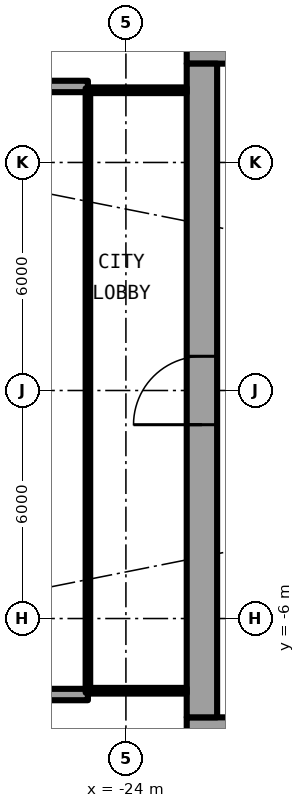
"""IFC4 building model, lengths in metres.
Left out: names, types, materials, properties, quantities, classifications, styles, units other than length and angle.
Written with IfcOpenShell. Run it as: python <this file> out.ifc"""

import sys

from ifc_helpers import new_model, si_unit, direction, frame, frame_2d, origin, place, context, subcontext, project, spatial, rectangle, extrude, element, fill, save


model = new_model("IFC4")
c1 = context("Model", 3, precision=1e-05, world=origin(), true_north=direction((0.0, 1.0)))
c2 = subcontext(c1, "Body", "Model", "MODEL_VIEW")
j1 = project(units=[si_unit("LENGTHUNIT", "METRE"), si_unit("PLANEANGLEUNIT", "RADIAN")], contexts=[c1])
p1 = place(None, origin())
s1 = spatial("IfcSite", under=j1, at=p1, CompositionType="ELEMENT")
p2 = place(p1, origin())
s2 = spatial("IfcBuilding", under=s1, at=p2, CompositionType="ELEMENT")
p3 = place(p2, frame((0.0, 0.0, 31.95)))
s3 = spatial("IfcBuildingStorey", under=s2, at=p3, CompositionType="ELEMENT", Elevation=31.95)
for number, where, z_axis, x_axis in (
    (1, (-25.0, 8.0, 0.0), (0.0, 0.0, 1.0), (-1.0, 0.0, 0.0)),
    (2, (-25.0, -8.0, 0.0), (0.0, 0.0, 1.0), (-1.0, 0.0, 0.0)),
):
    element("IfcWall", number, at=place(p3, frame(where, z_axis=z_axis, x_axis=x_axis)), inside=s3, PredefinedType="SOLIDWALL", context=c2, shape_type="SweptSolid", body=[
        extrude(rectangle(XDim=2.667, YDim=0.3, at=frame_2d((1.333, 0.0))), origin(), (0.0, 0.0, 1.0), 2.7),
    ])
p4 = place(p3, frame((-22.4, -9.0, 0.0), z_axis=(0.0, 0.0, 1.0), x_axis=(1.0, 0.0, 0.0)))
e3 = element("IfcWall", 3, at=p4, inside=s3, PredefinedType="SHEAR", context=c2, shape_type="SweptSolid", body=[
    extrude(rectangle(XDim=14.2, YDim=0.8, at=frame_2d((7.1, 0.0))), origin(), (0.0, 0.0, 1.0), 3.05),
])
p5 = place(p4, frame((1.325, 0.0, 0.0)))
e4 = element("IfcOpeningElement", 4, at=p5, cuts=e3, PredefinedType="OPENING", context=c2, shape_type="SweptSolid", body=[
    extrude(rectangle(XDim=1.2, YDim=2.3, at=frame_2d((0.6, 1.15))), frame((0.0, 0.41, 0.0), z_axis=(0.0, -1.0, 0.0), x_axis=(1.0, 0.0, 0.0)), (0.0, 0.0, 1.0), 0.82),
])
p6 = place(p3, frame((-8.2, 9.0, 0.0), z_axis=(0.0, 0.0, 1.0), x_axis=(-1.0, 0.0, 0.0)))
e5 = element("IfcWall", 5, at=p6, inside=s3, PredefinedType="SHEAR", context=c2, shape_type="SweptSolid", body=[
    extrude(rectangle(XDim=14.2, YDim=0.8, at=frame_2d((7.1, 0.0))), origin(), (0.0, 0.0, 1.0), 3.05),
])
p7 = place(p6, frame((11.675, 0.0, 0.0)))
e6 = element("IfcOpeningElement", 6, at=p7, cuts=e5, PredefinedType="OPENING", context=c2, shape_type="SweptSolid", body=[
    extrude(rectangle(XDim=1.2, YDim=2.3, at=frame_2d((0.6, 1.15))), frame((0.0, 0.41, 0.0), z_axis=(0.0, -1.0, 0.0), x_axis=(1.0, 0.0, 0.0)), (0.0, 0.0, 1.0), 0.82),
])
p8 = place(p3, frame((-22.0, -8.6, 0.0), z_axis=(0.0, 0.0, 1.0), x_axis=(0.0, 1.0, 0.0)))
e7 = element("IfcWall", 7, at=p8, inside=s3, PredefinedType="SHEAR", context=c2, shape_type="SweptSolid", body=[
    extrude(rectangle(XDim=17.2, YDim=0.8, at=frame_2d((8.6, 0.0))), origin(), (0.0, 0.0, 1.0), 3.05),
])
p9 = place(p8, frame((7.7, 0.0, 0.0)))
e8 = element("IfcOpeningElement", 8, at=p9, cuts=e7, PredefinedType="OPENING", context=c2, shape_type="SweptSolid", body=[
    extrude(rectangle(XDim=1.8, YDim=2.3, at=frame_2d((0.9, 1.15))), frame((0.0, 0.41, 0.0), z_axis=(0.0, -1.0, 0.0), x_axis=(1.0, 0.0, 0.0)), (0.0, 0.0, 1.0), 0.82),
])
for number, where, z_axis, x_axis in (
    (9, (-22.4, 7.9, 0.0), (0.0, 0.0, 1.0), (-1.0, 0.0, 0.0)),
    (10, (-22.4, -7.9, 0.0), (0.0, 0.0, 1.0), (-1.0, 0.0, 0.0)),
):
    element("IfcWall", number, at=place(p3, frame(where, z_axis=z_axis, x_axis=x_axis)), inside=s3, PredefinedType="PARTITIONING", context=c2, shape_type="SweptSolid", body=[
        extrude(rectangle(XDim=2.54, YDim=0.15, at=frame_2d((1.27, 0.0))), origin(), (0.0, 0.0, 1.0), 2.7),
    ])
p10 = place(p3, frame((-25.0, 7.95, 0.0), z_axis=(0.0, 0.0, 1.0), x_axis=(0.0, -1.0, 0.0)))
e11 = element("IfcWall", 11, at=p10, inside=s3, PredefinedType="PARTITIONING", context=c2, shape_type="SweptSolid", body=[
    extrude(rectangle(XDim=15.9, YDim=0.12, at=frame_2d((7.95, 0.0))), origin(), (0.0, 0.0, 1.0), 2.7),
])
p11 = place(p10, frame((0.95, 0.0, 0.1)))
e12 = element("IfcOpeningElement", 12, at=p11, cuts=e11, PredefinedType="OPENING", context=c2, shape_type="SweptSolid", body=[
    extrude(rectangle(XDim=14.0, YDim=2.35, at=frame_2d((7.0, 1.175))), frame((0.0, 0.07, 0.0), z_axis=(0.0, -1.0, 0.0), x_axis=(1.0, 0.0, 0.0)), (0.0, 0.0, 1.0), 0.14),
])
p12 = place(p9, origin())
e13 = element("IfcDoor", 13, at=p12, inside=s3, OperationType="SINGLE_SWING_LEFT", PredefinedType="DOOR", context=c2, shape_type="SweptSolid", body=[
    extrude(rectangle(XDim=1.8, YDim=2.3, at=frame_2d((0.9, 1.15))), frame((0.0, 0.025, 0.0), z_axis=(0.0, -1.0, 0.0), x_axis=(1.0, 0.0, 0.0)), (0.0, 0.0, 1.0), 0.05),
])
fill(e8, e13)
p13 = place(p11, origin())
e14 = element("IfcWindow", 14, at=p13, inside=s3, PartitioningType="SINGLE_PANEL", PredefinedType="WINDOW", context=c2, shape_type="SweptSolid", body=[
    extrude(rectangle(XDim=14.0, YDim=2.35, at=frame_2d((7.0, 1.175))), frame((0.0, 0.03, 0.0), z_axis=(0.0, -1.0, 0.0), x_axis=(1.0, 0.0, 0.0)), (0.0, 0.0, 1.0), 0.06),
])
fill(e12, e14)
save(model, sys.argv[1])
